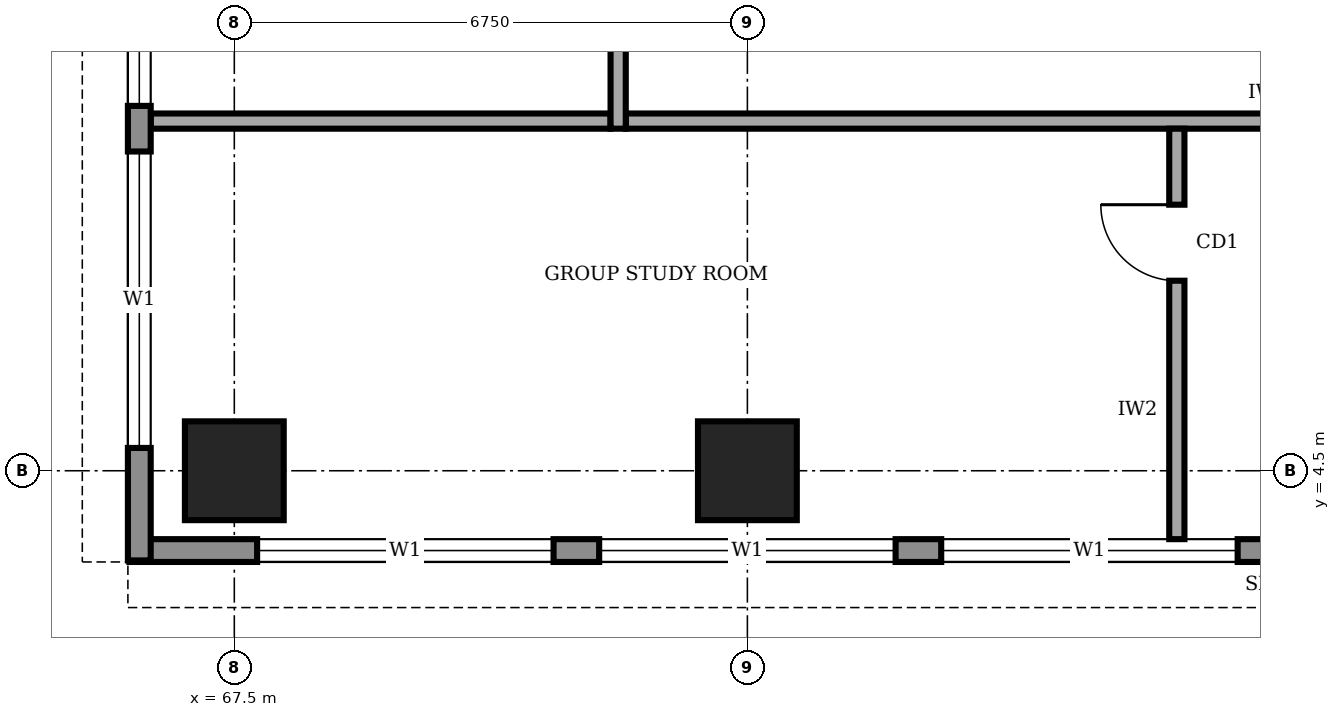
"""IFC4 building model, lengths in metres.
Left out: names, types, materials, properties, quantities, classifications, styles, units other than length and angle.
Written with IfcOpenShell. Run it as: python <this file> out.ifc"""

import sys

from ifc_helpers import new_model, si_unit, direction, frame, frame_2d, origin, origin_2d, place, context, subcontext, project, spatial, rectangle, extrude, element, fill, save


model = new_model("IFC4")
c1 = context("Model", 3, precision=1e-05, world=origin(), true_north=direction((0.0, 1.0)))
c2 = subcontext(c1, "Body", "Model", "MODEL_VIEW")
j1 = project(units=[si_unit("LENGTHUNIT", "METRE"), si_unit("PLANEANGLEUNIT", "RADIAN")], contexts=[c1])
p1 = place(None, origin())
s1 = spatial("IfcSite", under=j1, at=p1, CompositionType="ELEMENT")
p2 = place(p1, origin())
s2 = spatial("IfcBuilding", under=s1, at=p2, CompositionType="ELEMENT")
p3 = place(p2, frame((0.0, 0.0, 221.0)))
s3 = spatial("IfcBuildingStorey", under=s2, at=p3, CompositionType="ELEMENT", Elevation=221.0)
for number, where, z_axis, x_axis in (
    (1, (67.5, 4.5, 0.0), (0.0, 0.0, 1.0), (1.0, 0.0, 0.0)),
    (2, (74.25, 4.5, 0.0), (0.0, 0.0, 1.0), (1.0, 0.0, 0.0)),
):
    element("IfcColumn", number, at=place(p3, frame(where, z_axis=z_axis, x_axis=x_axis)), inside=s3, PredefinedType="COLUMN", context=c2, shape_type="SweptSolid", body=[
        extrude(rectangle(XDim=1.3, YDim=1.3, at=origin_2d()), origin(), (0.0, 0.0, 1.0), 4.0),
    ])
p4 = place(p3, frame((66.12, 3.45, 0.0), z_axis=(0.0, 0.0, 1.0), x_axis=(1.0, 0.0, 0.0)))
e3 = element("IfcWall", 3, at=p4, inside=s3, PredefinedType="STANDARD", context=c2, shape_type="SweptSolid", body=[
    extrude(rectangle(XDim=29.91, YDim=0.3, at=frame_2d((14.955, 0.0))), origin(), (0.0, 0.0, 1.0), 3.75),
])
p5 = place(p4, frame((1.68, 0.0, 0.9)))
e4 = element("IfcOpeningElement", 4, at=p5, cuts=e3, PredefinedType="OPENING", context=c2, shape_type="SweptSolid", body=[
    extrude(rectangle(XDim=3.9, YDim=2.2, at=frame_2d((1.95, 1.1))), frame((0.0, 0.16, 0.0), z_axis=(0.0, -1.0, 0.0), x_axis=(1.0, 0.0, 0.0)), (0.0, 0.0, 1.0), 0.32),
])
p6 = place(p4, frame((6.18, 0.0, 0.9)))
e5 = element("IfcOpeningElement", 5, at=p6, cuts=e3, PredefinedType="OPENING", context=c2, shape_type="SweptSolid", body=[
    extrude(rectangle(XDim=3.9, YDim=2.2, at=frame_2d((1.95, 1.1))), frame((0.0, 0.16, 0.0), z_axis=(0.0, -1.0, 0.0), x_axis=(1.0, 0.0, 0.0)), (0.0, 0.0, 1.0), 0.32),
])
p7 = place(p4, frame((10.68, 0.0, 0.9)))
e6 = element("IfcOpeningElement", 6, at=p7, cuts=e3, PredefinedType="OPENING", context=c2, shape_type="SweptSolid", body=[
    extrude(rectangle(XDim=3.9, YDim=2.2, at=frame_2d((1.95, 1.1))), frame((0.0, 0.16, 0.0), z_axis=(0.0, -1.0, 0.0), x_axis=(1.0, 0.0, 0.0)), (0.0, 0.0, 1.0), 0.32),
])
p8 = place(p4, frame((15.18, 0.0, 0.9)))
e7 = element("IfcOpeningElement", 7, at=p8, cuts=e3, PredefinedType="OPENING", context=c2, shape_type="SweptSolid", body=[
    extrude(rectangle(XDim=3.9, YDim=2.2, at=frame_2d((1.95, 1.1))), frame((0.0, 0.16, 0.0), z_axis=(0.0, -1.0, 0.0), x_axis=(1.0, 0.0, 0.0)), (0.0, 0.0, 1.0), 0.32),
])
p9 = place(p4, frame((19.68, 0.0, 0.9)))
e8 = element("IfcOpeningElement", 8, at=p9, cuts=e3, PredefinedType="OPENING", context=c2, shape_type="SweptSolid", body=[
    extrude(rectangle(XDim=3.9, YDim=2.2, at=frame_2d((1.95, 1.1))), frame((0.0, 0.16, 0.0), z_axis=(0.0, -1.0, 0.0), x_axis=(1.0, 0.0, 0.0)), (0.0, 0.0, 1.0), 0.32),
])
p10 = place(p4, frame((24.18, 0.0, 0.9)))
e9 = element("IfcOpeningElement", 9, at=p10, cuts=e3, PredefinedType="OPENING", context=c2, shape_type="SweptSolid", body=[
    extrude(rectangle(XDim=3.9, YDim=2.2, at=frame_2d((1.95, 1.1))), frame((0.0, 0.16, 0.0), z_axis=(0.0, -1.0, 0.0), x_axis=(1.0, 0.0, 0.0)), (0.0, 0.0, 1.0), 0.32),
])
p11 = place(p3, frame((66.25, 37.18, 0.0), z_axis=(0.0, 0.0, 1.0), x_axis=(0.0, -1.0, 0.0)))
e10 = element("IfcWall", 10, at=p11, inside=s3, PredefinedType="STANDARD", context=c2, shape_type="SweptSolid", body=[
    extrude(rectangle(XDim=33.86, YDim=0.3, at=frame_2d((16.93, 0.0))), origin(), (0.0, 0.0, 1.0), 3.75),
])
p12 = place(p11, frame((28.48, 0.0, 0.9)))
e11 = element("IfcOpeningElement", 11, at=p12, cuts=e10, PredefinedType="OPENING", context=c2, shape_type="SweptSolid", body=[
    extrude(rectangle(XDim=3.9, YDim=2.2, at=frame_2d((1.95, 1.1))), frame((0.0, 0.16, 0.0), z_axis=(0.0, -1.0, 0.0), x_axis=(1.0, 0.0, 0.0)), (0.0, 0.0, 1.0), 0.32),
])
p13 = place(p11, frame((23.98, 0.0, 0.9)))
e12 = element("IfcOpeningElement", 12, at=p13, cuts=e10, PredefinedType="OPENING", context=c2, shape_type="SweptSolid", body=[
    extrude(rectangle(XDim=3.9, YDim=2.2, at=frame_2d((1.95, 1.1))), frame((0.0, 0.16, 0.0), z_axis=(0.0, -1.0, 0.0), x_axis=(1.0, 0.0, 0.0)), (0.0, 0.0, 1.0), 0.32),
])
p14 = place(p11, frame((19.48, 0.0, 0.9)))
e13 = element("IfcOpeningElement", 13, at=p14, cuts=e10, PredefinedType="OPENING", context=c2, shape_type="SweptSolid", body=[
    extrude(rectangle(XDim=3.9, YDim=2.2, at=frame_2d((1.95, 1.1))), frame((0.0, 0.16, 0.0), z_axis=(0.0, -1.0, 0.0), x_axis=(1.0, 0.0, 0.0)), (0.0, 0.0, 1.0), 0.32),
])
p15 = place(p11, frame((14.98, 0.0, 0.9)))
e14 = element("IfcOpeningElement", 14, at=p15, cuts=e10, PredefinedType="OPENING", context=c2, shape_type="SweptSolid", body=[
    extrude(rectangle(XDim=3.9, YDim=2.2, at=frame_2d((1.95, 1.1))), frame((0.0, 0.16, 0.0), z_axis=(0.0, -1.0, 0.0), x_axis=(1.0, 0.0, 0.0)), (0.0, 0.0, 1.0), 0.32),
])
p16 = place(p11, frame((10.48, 0.0, 0.9)))
e15 = element("IfcOpeningElement", 15, at=p16, cuts=e10, PredefinedType="OPENING", context=c2, shape_type="SweptSolid", body=[
    extrude(rectangle(XDim=3.9, YDim=2.2, at=frame_2d((1.95, 1.1))), frame((0.0, 0.16, 0.0), z_axis=(0.0, -1.0, 0.0), x_axis=(1.0, 0.0, 0.0)), (0.0, 0.0, 1.0), 0.32),
])
p17 = place(p11, frame((5.98, 0.0, 0.9)))
e16 = element("IfcOpeningElement", 16, at=p17, cuts=e10, PredefinedType="OPENING", context=c2, shape_type="SweptSolid", body=[
    extrude(rectangle(XDim=3.9, YDim=2.2, at=frame_2d((1.95, 1.1))), frame((0.0, 0.16, 0.0), z_axis=(0.0, -1.0, 0.0), x_axis=(1.0, 0.0, 0.0)), (0.0, 0.0, 1.0), 0.32),
])
p18 = place(p11, frame((1.48, 0.0, 0.9)))
e17 = element("IfcOpeningElement", 17, at=p18, cuts=e10, PredefinedType="OPENING", context=c2, shape_type="SweptSolid", body=[
    extrude(rectangle(XDim=3.9, YDim=2.2, at=frame_2d((1.95, 1.1))), frame((0.0, 0.16, 0.0), z_axis=(0.0, -1.0, 0.0), x_axis=(1.0, 0.0, 0.0)), (0.0, 0.0, 1.0), 0.32),
])
p19 = place(p3, frame((72.65, 9.1, 0.0), z_axis=(0.0, 0.0, 1.0), x_axis=(1.0, 0.0, 0.0)))
e18 = element("IfcWall", 18, at=p19, inside=s3, PredefinedType="SOLIDWALL", context=c2, shape_type="SweptSolid", body=[
    extrude(rectangle(XDim=16.9, YDim=0.2, at=frame_2d((8.45, 0.0))), origin(), (0.0, 0.0, 1.0), 3.75),
])
p20 = place(p3, frame((72.55, 32.8, 0.0), z_axis=(0.0, 0.0, 1.0), x_axis=(0.0, -1.0, 0.0)))
e19 = element("IfcWall", 19, at=p20, inside=s3, PredefinedType="SOLIDWALL", context=c2, shape_type="SweptSolid", body=[
    extrude(rectangle(XDim=23.8, YDim=0.2, at=frame_2d((11.9, 0.0))), origin(), (0.0, 0.0, 1.0), 3.75),
])
p21 = place(p20, frame((21.05, 0.0, 0.0)))
e20 = element("IfcOpeningElement", 20, at=p21, cuts=e19, PredefinedType="OPENING", context=c2, shape_type="SweptSolid", body=[
    extrude(rectangle(XDim=1.0, YDim=2.1, at=frame_2d((0.5, 1.05))), frame((0.0, 0.11, 0.0), z_axis=(0.0, -1.0, 0.0), x_axis=(1.0, 0.0, 0.0)), (0.0, 0.0, 1.0), 0.22),
])
p22 = place(p20, frame((14.3, 0.0, 0.0)))
e21 = element("IfcOpeningElement", 21, at=p22, cuts=e19, PredefinedType="OPENING", context=c2, shape_type="SweptSolid", body=[
    extrude(rectangle(XDim=1.0, YDim=2.1, at=frame_2d((0.5, 1.05))), frame((0.0, 0.11, 0.0), z_axis=(0.0, -1.0, 0.0), x_axis=(1.0, 0.0, 0.0)), (0.0, 0.0, 1.0), 0.22),
])
p23 = place(p20, frame((7.55, 0.0, 0.0)))
e22 = element("IfcOpeningElement", 22, at=p23, cuts=e19, PredefinedType="OPENING", context=c2, shape_type="SweptSolid", body=[
    extrude(rectangle(XDim=1.0, YDim=2.1, at=frame_2d((0.5, 1.05))), frame((0.0, 0.11, 0.0), z_axis=(0.0, -1.0, 0.0), x_axis=(1.0, 0.0, 0.0)), (0.0, 0.0, 1.0), 0.22),
])
p24 = place(p20, frame((2.3, 0.0, 0.0)))
e23 = element("IfcOpeningElement", 23, at=p24, cuts=e19, PredefinedType="OPENING", context=c2, shape_type="SweptSolid", body=[
    extrude(rectangle(XDim=1.0, YDim=2.1, at=frame_2d((0.5, 1.05))), frame((0.0, 0.11, 0.0), z_axis=(0.0, -1.0, 0.0), x_axis=(1.0, 0.0, 0.0)), (0.0, 0.0, 1.0), 0.22),
])
p25 = place(p3, frame((79.9, 3.6, 0.0), z_axis=(0.0, 0.0, 1.0), x_axis=(0.0, 1.0, 0.0)))
e24 = element("IfcWall", 24, at=p25, inside=s3, PredefinedType="SOLIDWALL", context=c2, shape_type="SweptSolid", body=[
    extrude(rectangle(XDim=5.4, YDim=0.2, at=frame_2d((2.7, 0.0))), origin(), (0.0, 0.0, 1.0), 3.75),
])
p26 = place(p25, frame((3.4, 0.0, 0.0)))
e25 = element("IfcOpeningElement", 25, at=p26, cuts=e24, PredefinedType="OPENING", context=c2, shape_type="SweptSolid", body=[
    extrude(rectangle(XDim=1.0, YDim=2.1, at=frame_2d((0.5, 1.05))), frame((0.0, 0.11, 0.0), z_axis=(0.0, -1.0, 0.0), x_axis=(1.0, 0.0, 0.0)), (0.0, 0.0, 1.0), 0.22),
])
p27 = place(p3, frame((66.4, 9.1, 0.0), z_axis=(0.0, 0.0, 1.0), x_axis=(1.0, 0.0, 0.0)))
e26 = element("IfcWall", 26, at=p27, inside=s3, PredefinedType="SOLIDWALL", context=c2, shape_type="SweptSolid", body=[
    extrude(rectangle(XDim=6.05, YDim=0.2, at=frame_2d((3.025, 0.0))), origin(), (0.0, 0.0, 1.0), 3.75),
])
p28 = place(p5, origin())
e27 = element("IfcWindow", 27, at=p28, inside=s3, PartitioningType="SINGLE_PANEL", PredefinedType="WINDOW", context=c2, shape_type="SweptSolid", body=[
    extrude(rectangle(XDim=3.9, YDim=2.2, at=frame_2d((1.95, 1.1))), frame((0.0, 0.03, 0.0), z_axis=(0.0, -1.0, 0.0), x_axis=(1.0, 0.0, 0.0)), (0.0, 0.0, 1.0), 0.06),
])
fill(e4, e27)
p29 = place(p6, origin())
e28 = element("IfcWindow", 28, at=p29, inside=s3, PartitioningType="SINGLE_PANEL", PredefinedType="WINDOW", context=c2, shape_type="SweptSolid", body=[
    extrude(rectangle(XDim=3.9, YDim=2.2, at=frame_2d((1.95, 1.1))), frame((0.0, 0.03, 0.0), z_axis=(0.0, -1.0, 0.0), x_axis=(1.0, 0.0, 0.0)), (0.0, 0.0, 1.0), 0.06),
])
fill(e5, e28)
p30 = place(p7, origin())
e29 = element("IfcWindow", 29, at=p30, inside=s3, PartitioningType="SINGLE_PANEL", PredefinedType="WINDOW", context=c2, shape_type="SweptSolid", body=[
    extrude(rectangle(XDim=3.9, YDim=2.2, at=frame_2d((1.95, 1.1))), frame((0.0, 0.03, 0.0), z_axis=(0.0, -1.0, 0.0), x_axis=(1.0, 0.0, 0.0)), (0.0, 0.0, 1.0), 0.06),
])
fill(e6, e29)
p31 = place(p12, origin())
e30 = element("IfcWindow", 30, at=p31, inside=s3, PartitioningType="SINGLE_PANEL", PredefinedType="WINDOW", context=c2, shape_type="SweptSolid", body=[
    extrude(rectangle(XDim=3.9, YDim=2.2, at=frame_2d((1.95, 1.1))), frame((0.0, 0.03, 0.0), z_axis=(0.0, -1.0, 0.0), x_axis=(1.0, 0.0, 0.0)), (0.0, 0.0, 1.0), 0.06),
])
fill(e11, e30)
p32 = place(p13, origin())
e31 = element("IfcWindow", 31, at=p32, inside=s3, PartitioningType="SINGLE_PANEL", PredefinedType="WINDOW", context=c2, shape_type="SweptSolid", body=[
    extrude(rectangle(XDim=3.9, YDim=2.2, at=frame_2d((1.95, 1.1))), frame((0.0, 0.03, 0.0), z_axis=(0.0, -1.0, 0.0), x_axis=(1.0, 0.0, 0.0)), (0.0, 0.0, 1.0), 0.06),
])
fill(e12, e31)
p33 = place(p26, origin())
e32 = element("IfcDoor", 32, at=p33, inside=s3, OperationType="SINGLE_SWING_RIGHT", PredefinedType="DOOR", context=c2, shape_type="SweptSolid", body=[
    extrude(rectangle(XDim=1.0, YDim=2.1, at=frame_2d((0.5, 1.05))), frame((0.0, 0.025, 0.0), z_axis=(0.0, -1.0, 0.0), x_axis=(1.0, 0.0, 0.0)), (0.0, 0.0, 1.0), 0.05),
])
fill(e25, e32)
save(model, sys.argv[1])
